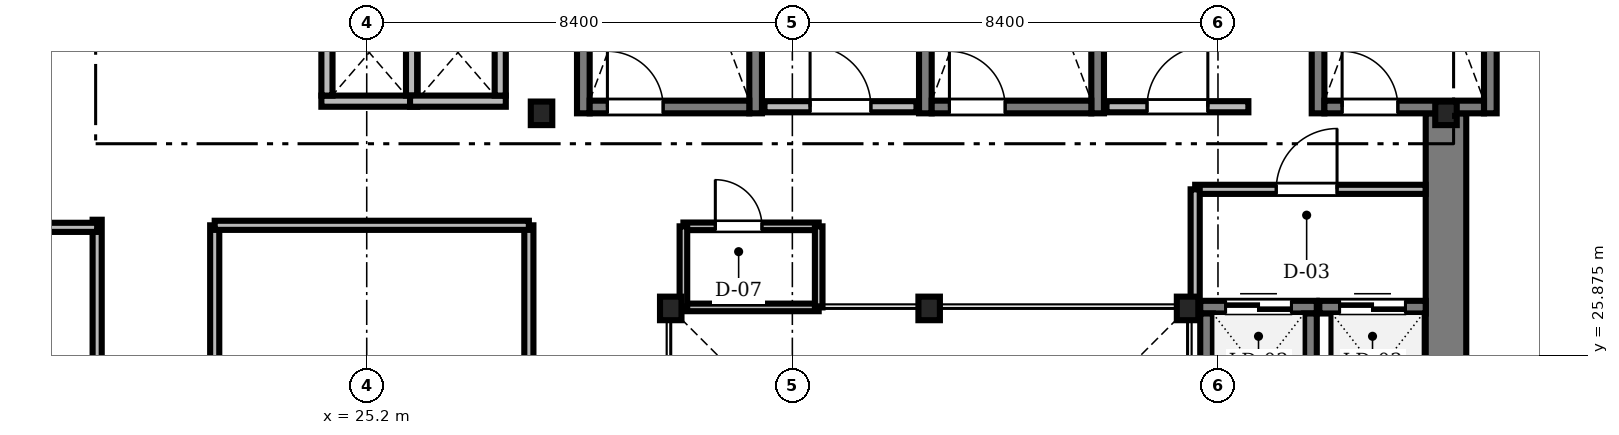
"""IFC4 building model, lengths in metres.
Left out: names, types, materials, properties, quantities, classifications, styles, units other than length and angle.
Written with IfcOpenShell. Run it as: python <this file> out.ifc"""

import sys

from ifc_helpers import new_model, si_unit, direction, frame, frame_2d, origin, origin_2d, place, context, subcontext, project, spatial, rectangle, i_section, extrude, source, transform, mapped, element, fill, save


model = new_model("IFC4")
c1 = context("Model", 3, precision=1e-05, world=origin(), true_north=direction((0.0, 1.0)))
c2 = subcontext(c1, "Body", "Model", "MODEL_VIEW")
j1 = project(units=[si_unit("LENGTHUNIT", "METRE"), si_unit("PLANEANGLEUNIT", "RADIAN")], contexts=[c1])
p1 = place(None, origin())
s1 = spatial("IfcSite", under=j1, at=p1, CompositionType="ELEMENT")
p2 = place(p1, origin())
s2 = spatial("IfcBuilding", under=s1, at=p2, CompositionType="ELEMENT")
p3 = place(p2, frame((0.0, 0.0, 122.4)))
s3 = spatial("IfcBuildingStorey", under=s2, at=p3, CompositionType="ELEMENT", Elevation=122.4)
m1 = source(origin(), c2, "Body", "SweptSolid", [
    extrude(rectangle(XDim=13.15, YDim=0.8, at=frame_2d((6.575, 0.0))), origin(), (0.0, 0.0, 1.0), 3.46),
])
p4 = place(p3, frame((46.5, 17.5, 0.0), z_axis=(0.0, 0.0, 1.0), x_axis=(0.0, 1.0, 0.0)))
e1 = element("IfcWall", 1, at=p4, inside=s3, PredefinedType="SHEAR", context=c2, shape_type="MappedRepresentation", body=[
    mapped(m1, transform((0.0, 0.0, 0.0), scale=1.0)),
])
m2 = source(origin(), c2, "Body", "SweptSolid", [
    extrude(i_section(OverallWidth=0.424, OverallDepth=0.465, WebThickness=0.035, FlangeThickness=0.056, FilletRadius=0.015, at=origin_2d()), origin(), (0.0, 0.0, 1.0), 3.46),
])
for number, where, z_axis, x_axis in (
    (2, (41.4, 26.8, 0.0), (0.0, 0.0, 1.0), (1.0, 0.0, 0.0)),
    (3, (36.3, 26.8, 0.0), (0.0, 0.0, 1.0), (1.0, 0.0, 0.0)),
    (4, (31.2, 26.8, 0.0), (0.0, 0.0, 1.0), (1.0, 0.0, 0.0)),
    (5, (28.65, 30.65, 0.0), (0.0, 0.0, 1.0), (1.0, 0.0, 0.0)),
    (6, (46.5, 30.65, 0.0), (0.0, 0.0, 1.0), (1.0, 0.0, 0.0)),
):
    element("IfcColumn", number, at=place(p3, frame(where, z_axis=z_axis, x_axis=x_axis)), inside=s3, PredefinedType="COLUMN", context=c2, shape_type="MappedRepresentation", body=[
        mapped(m2, transform((0.0, 0.0, 0.0), scale=1.0)),
    ])
m3 = source(origin(), c2, "Body", "SweptSolid", [
    extrude(rectangle(XDim=9.25, YDim=0.25, at=frame_2d((4.625, 0.0))), origin(), (0.0, 0.0, 1.0), 3.5),
])
for number, where, z_axis, x_axis in (
    (7, (29.475, 30.65, 0.0), (0.0, 0.0, 1.0), (0.0, 1.0, 0.0)),
    (8, (32.875, 30.65, 0.0), (0.0, 0.0, 1.0), (0.0, 1.0, 0.0)),
):
    element("IfcWall", number, at=place(p3, frame(where, z_axis=z_axis, x_axis=x_axis)), inside=s3, PredefinedType="SOLIDWALL", context=c2, shape_type="MappedRepresentation", body=[
        mapped(m3, transform((0.0, 0.0, 0.0), scale=1.0)),
    ])
m4 = source(origin(), c2, "Body", "SweptSolid", [
    extrude(rectangle(XDim=3.15, YDim=0.25, at=frame_2d((1.575, 0.0))), origin(), (0.0, 0.0, 1.0), 3.5),
])
p5 = place(p3, frame((29.6, 30.775, 0.0), z_axis=(0.0, 0.0, 1.0), x_axis=(1.0, 0.0, 0.0)))
e9 = element("IfcWall", 9, at=p5, inside=s3, PredefinedType="SOLIDWALL", context=c2, shape_type="MappedRepresentation", body=[
    mapped(m4, transform((0.0, 0.0, 0.0), scale=1.0)),
])
m5 = source(origin(), c2, "Body", "SweptSolid", [
    extrude(rectangle(XDim=1.1, YDim=2.2, at=frame_2d((0.55, 1.1))), frame((0.0, 0.135, 0.0), z_axis=(0.0, -1.0, 0.0), x_axis=(1.0, 0.0, 0.0)), (0.0, 0.0, 1.0), 0.27),
])
p6 = place(p5, frame((0.35, 0.0, 0.0)))
e10 = element("IfcOpeningElement", 10, at=p6, cuts=e9, PredefinedType="OPENING", context=c2, shape_type="MappedRepresentation", body=[
    mapped(m5, transform((0.0, 0.0, 0.0), scale=1.0)),
])
for number, where, z_axis, x_axis in (
    (11, (36.225, 30.65, 0.0), (0.0, 0.0, 1.0), (0.0, 1.0, 0.0)),
    (12, (39.625, 30.65, 0.0), (0.0, 0.0, 1.0), (0.0, 1.0, 0.0)),
):
    element("IfcWall", number, at=place(p3, frame(where, z_axis=z_axis, x_axis=x_axis)), inside=s3, PredefinedType="SOLIDWALL", context=c2, shape_type="MappedRepresentation", body=[
        mapped(m3, transform((0.0, 0.0, 0.0), scale=1.0)),
    ])
p7 = place(p3, frame((36.35, 30.775, 0.0), z_axis=(0.0, 0.0, 1.0), x_axis=(1.0, 0.0, 0.0)))
e13 = element("IfcWall", 13, at=p7, inside=s3, PredefinedType="SOLIDWALL", context=c2, shape_type="MappedRepresentation", body=[
    mapped(m4, transform((0.0, 0.0, 0.0), scale=1.0)),
])
p8 = place(p7, frame((0.35, 0.0, 0.0)))
e14 = element("IfcOpeningElement", 14, at=p8, cuts=e13, PredefinedType="OPENING", context=c2, shape_type="MappedRepresentation", body=[
    mapped(m5, transform((0.0, 0.0, 0.0), scale=1.0)),
])
for number, where, z_axis, x_axis in (
    (15, (43.975, 30.65, 0.0), (0.0, 0.0, 1.0), (0.0, 1.0, 0.0)),
    (16, (47.375, 30.65, 0.0), (0.0, 0.0, 1.0), (0.0, 1.0, 0.0)),
):
    element("IfcWall", number, at=place(p3, frame(where, z_axis=z_axis, x_axis=x_axis)), inside=s3, PredefinedType="SOLIDWALL", context=c2, shape_type="MappedRepresentation", body=[
        mapped(m3, transform((0.0, 0.0, 0.0), scale=1.0)),
    ])
p9 = place(p3, frame((44.1, 30.775, 0.0), z_axis=(0.0, 0.0, 1.0), x_axis=(1.0, 0.0, 0.0)))
e17 = element("IfcWall", 17, at=p9, inside=s3, PredefinedType="SOLIDWALL", context=c2, shape_type="MappedRepresentation", body=[
    mapped(m4, transform((0.0, 0.0, 0.0), scale=1.0)),
])
p10 = place(p9, frame((0.35, 0.0, 0.0)))
e18 = element("IfcOpeningElement", 18, at=p10, cuts=e17, PredefinedType="OPENING", context=c2, shape_type="MappedRepresentation", body=[
    mapped(m5, transform((0.0, 0.0, 0.0), scale=1.0)),
])
m6 = source(origin(), c2, "Body", "SweptSolid", [
    extrude(rectangle(XDim=3.0, YDim=0.22, at=frame_2d((1.5, 0.0))), origin(), (0.0, 0.0, 1.0), 3.46),
])
p11 = place(p3, frame((33.05, 30.78, 0.0), z_axis=(0.0, 0.0, 1.0), x_axis=(1.0, 0.0, 0.0)))
e19 = element("IfcWall", 19, at=p11, inside=s3, PredefinedType="SOLIDWALL", context=c2, shape_type="MappedRepresentation", body=[
    mapped(m6, transform((0.0, 0.0, 0.0), scale=1.0)),
])
m7 = source(origin(), c2, "Body", "SweptSolid", [
    extrude(rectangle(XDim=1.2, YDim=2.2, at=frame_2d((0.6, 1.1))), frame((0.0, 0.12, 0.0), z_axis=(0.0, -1.0, 0.0), x_axis=(1.0, 0.0, 0.0)), (0.0, 0.0, 1.0), 0.24),
])
p12 = place(p11, frame((0.9, 0.0, 0.0)))
e20 = element("IfcOpeningElement", 20, at=p12, cuts=e19, PredefinedType="OPENING", context=c2, shape_type="MappedRepresentation", body=[
    mapped(m7, transform((0.0, 0.0, 0.0), scale=1.0)),
])
m8 = source(origin(), c2, "Body", "SweptSolid", [
    extrude(rectangle(XDim=2.8, YDim=0.22, at=frame_2d((1.4, 0.0))), origin(), (0.0, 0.0, 1.0), 3.46),
])
p13 = place(p3, frame((39.8, 30.78, 0.0), z_axis=(0.0, 0.0, 1.0), x_axis=(1.0, 0.0, 0.0)))
e21 = element("IfcWall", 21, at=p13, inside=s3, PredefinedType="SOLIDWALL", context=c2, shape_type="MappedRepresentation", body=[
    mapped(m8, transform((0.0, 0.0, 0.0), scale=1.0)),
])
p14 = place(p13, frame((0.8, 0.0, 0.0)))
e22 = element("IfcOpeningElement", 22, at=p14, cuts=e21, PredefinedType="OPENING", context=c2, shape_type="MappedRepresentation", body=[
    mapped(m7, transform((0.0, 0.0, 0.0), scale=1.0)),
])
m9 = source(origin(), c2, "Body", "SweptSolid", [
    extrude(rectangle(XDim=1.89, YDim=0.22, at=frame_2d((0.945, 0.0))), origin(), (0.0, 0.0, 1.0), 3.46),
])
p15 = place(p3, frame((24.305, 30.89, 0.0), z_axis=(0.0, 0.0, 1.0), x_axis=(1.0, 0.0, 0.0)))
e23 = element("IfcWall", 23, at=p15, inside=s3, PredefinedType="SOLIDWALL", context=c2, shape_type="MappedRepresentation", body=[
    mapped(m9, transform((0.0, 0.0, 0.0), scale=1.0)),
])
m10 = source(origin(), c2, "Body", "SweptSolid", [
    extrude(rectangle(XDim=1.7, YDim=0.22, at=frame_2d((0.85, 0.0))), origin(), (0.0, 0.0, 1.0), 3.46),
])
for number, where, z_axis, x_axis in (
    (24, (24.415, 31.0, 0.0), (0.0, 0.0, 1.0), (0.0, 1.0, 0.0)),
    (25, (26.085, 31.0, 0.0), (0.0, 0.0, 1.0), (0.0, 1.0, 0.0)),
):
    element("IfcWall", number, at=place(p3, frame(where, z_axis=z_axis, x_axis=x_axis)), inside=s3, PredefinedType="SOLIDWALL", context=c2, shape_type="MappedRepresentation", body=[
        mapped(m10, transform((0.0, 0.0, 0.0), scale=1.0)),
    ])
p16 = place(p3, frame((26.055, 30.89, 0.0), z_axis=(0.0, 0.0, 1.0), x_axis=(1.0, 0.0, 0.0)))
e26 = element("IfcWall", 26, at=p16, inside=s3, PredefinedType="SOLIDWALL", context=c2, shape_type="MappedRepresentation", body=[
    mapped(m9, transform((0.0, 0.0, 0.0), scale=1.0)),
])
p17 = place(p3, frame((27.835, 31.0, 0.0), z_axis=(0.0, 0.0, 1.0), x_axis=(0.0, 1.0, 0.0)))
e27 = element("IfcWall", 27, at=p17, inside=s3, PredefinedType="SOLIDWALL", context=c2, shape_type="MappedRepresentation", body=[
    mapped(m10, transform((0.0, 0.0, 0.0), scale=1.0)),
])
m11 = source(origin(), c2, "Body", "SweptSolid", [
    extrude(rectangle(XDim=2.3, YDim=0.25, at=frame_2d((1.15, 0.0))), origin(), (0.0, 0.0, 1.0), 3.46),
])
p18 = place(p3, frame((41.65, 26.825, 0.0), z_axis=(0.0, 0.0, 1.0), x_axis=(1.0, 0.0, 0.0)))
e28 = element("IfcWall", 28, at=p18, inside=s3, PredefinedType="SOLIDWALL", context=c2, shape_type="MappedRepresentation", body=[
    mapped(m11, transform((0.0, 0.0, 0.0), scale=1.0)),
])
m12 = source(origin(), c2, "Body", "SweptSolid", [
    extrude(rectangle(XDim=1.3, YDim=2.3, at=frame_2d((0.65, 1.15))), frame((0.0, 0.135, 0.0), z_axis=(0.0, -1.0, 0.0), x_axis=(1.0, 0.0, 0.0)), (0.0, 0.0, 1.0), 0.27),
])
p19 = place(p18, frame((0.5, 0.0, 0.0)))
e29 = element("IfcOpeningElement", 29, at=p19, cuts=e28, PredefinedType="OPENING", context=c2, shape_type="MappedRepresentation", body=[
    mapped(m12, transform((0.0, 0.0, 0.0), scale=1.0)),
])
for number, where, z_axis, x_axis in (
    (30, (41.775, 24.4, 0.0), (0.0, 0.0, 1.0), (0.0, 1.0, 0.0)),
    (31, (43.825, 24.4, 0.0), (0.0, 0.0, 1.0), (0.0, 1.0, 0.0)),
):
    element("IfcWall", number, at=place(p3, frame(where, z_axis=z_axis, x_axis=x_axis)), inside=s3, PredefinedType="SOLIDWALL", context=c2, shape_type="MappedRepresentation", body=[
        mapped(m11, transform((0.0, 0.0, 0.0), scale=1.0)),
    ])
m13 = source(origin(), c2, "Body", "SweptSolid", [
    extrude(rectangle(XDim=2.1, YDim=0.25, at=frame_2d((1.05, 0.0))), origin(), (0.0, 0.0, 1.0), 3.46),
])
p20 = place(p3, frame((44.0, 26.825, 0.0), z_axis=(0.0, 0.0, 1.0), x_axis=(1.0, 0.0, 0.0)))
e32 = element("IfcWall", 32, at=p20, inside=s3, PredefinedType="SOLIDWALL", context=c2, shape_type="MappedRepresentation", body=[
    mapped(m13, transform((0.0, 0.0, 0.0), scale=1.0)),
])
p21 = place(p20, frame((0.4, 0.0, 0.0)))
e33 = element("IfcOpeningElement", 33, at=p21, cuts=e32, PredefinedType="OPENING", context=c2, shape_type="MappedRepresentation", body=[
    mapped(m12, transform((0.0, 0.0, 0.0), scale=1.0)),
])
m14 = source(origin(), c2, "Body", "SweptSolid", [
    extrude(rectangle(XDim=6.54, YDim=0.18, at=frame_2d((3.27, 0.0))), origin(), (0.0, 0.0, 1.0), 2.852),
])
p22 = place(p3, frame((22.2, 21.9, 0.0), z_axis=(0.0, 0.0, 1.0), x_axis=(0.0, 1.0, 0.0)))
e34 = element("IfcWall", 34, at=p22, inside=s3, PredefinedType="PARTITIONING", context=c2, shape_type="MappedRepresentation", body=[
    mapped(m14, transform((0.0, 0.0, 0.0), scale=1.0)),
])
m15 = source(origin(), c2, "Body", "SweptSolid", [
    extrude(rectangle(XDim=1.05, YDim=2.2, at=frame_2d((0.525, 1.1))), frame((0.0, 0.1, 0.0), z_axis=(0.0, -1.0, 0.0), x_axis=(1.0, 0.0, 0.0)), (0.0, 0.0, 1.0), 0.2),
])
p23 = place(p22, frame((2.2, 0.0, 0.0)))
e35 = element("IfcOpeningElement", 35, at=p23, cuts=e34, PredefinedType="OPENING", context=c2, shape_type="MappedRepresentation", body=[
    mapped(m15, transform((0.0, 0.0, 0.0), scale=1.0)),
])
m16 = source(origin(), c2, "Body", "SweptSolid", [
    extrude(rectangle(XDim=4.548, YDim=0.18, at=frame_2d((2.274, 0.0))), origin(), (0.0, 0.0, 1.0), 3.092),
])
p24 = place(p3, frame((41.55, 29.15, 0.0), z_axis=(0.0, 0.0, 1.0), x_axis=(1.0, 0.0, 0.0)))
e36 = element("IfcWall", 36, at=p24, inside=s3, PredefinedType="PARTITIONING", context=c2, shape_type="MappedRepresentation", body=[
    mapped(m16, transform((0.0, 0.0, 0.0), scale=1.0)),
])
m17 = source(origin(), c2, "Body", "SweptSolid", [
    extrude(rectangle(XDim=1.2, YDim=2.2, at=frame_2d((0.6, 1.1))), frame((0.0, 0.1, 0.0), z_axis=(0.0, -1.0, 0.0), x_axis=(1.0, 0.0, 0.0)), (0.0, 0.0, 1.0), 0.2),
])
p25 = place(p24, frame((1.6, 0.0, 0.0)))
e37 = element("IfcOpeningElement", 37, at=p25, cuts=e36, PredefinedType="OPENING", context=c2, shape_type="MappedRepresentation", body=[
    mapped(m17, transform((0.0, 0.0, 0.0), scale=1.0)),
])
m18 = source(origin(), c2, "Body", "SweptSolid", [
    extrude(rectangle(XDim=2.67, YDim=0.15, at=frame_2d((1.335, 0.0))), origin(), (0.0, 0.0, 1.0), 3.092),
])
p26 = place(p3, frame((31.45, 28.42, 0.0), z_axis=(0.0, 0.0, 1.0), x_axis=(1.0, 0.0, 0.0)))
e38 = element("IfcWall", 38, at=p26, inside=s3, PredefinedType="PARTITIONING", context=c2, shape_type="MappedRepresentation", body=[
    mapped(m18, transform((0.0, 0.0, 0.0), scale=1.0)),
])
m19 = source(origin(), c2, "Body", "SweptSolid", [
    extrude(rectangle(XDim=0.92, YDim=2.1, at=frame_2d((0.46, 1.05))), frame((0.0, 0.085, 0.0), z_axis=(0.0, -1.0, 0.0), x_axis=(1.0, 0.0, 0.0)), (0.0, 0.0, 1.0), 0.17),
])
p27 = place(p26, frame((0.63, 0.0, 0.0)))
e39 = element("IfcOpeningElement", 39, at=p27, cuts=e38, PredefinedType="OPENING", context=c2, shape_type="MappedRepresentation", body=[
    mapped(m19, transform((0.0, 0.0, 0.0), scale=1.0)),
])
m20 = source(origin(), c2, "Body", "SweptSolid", [
    extrude(rectangle(XDim=14.45, YDim=0.18, at=frame_2d((7.225, 0.0))), origin(), (0.0, 0.0, 1.0), 2.852),
])
p28 = place(p3, frame((19.88, 14.1, 0.0), z_axis=(0.0, 0.0, 1.0), x_axis=(0.0, 1.0, 0.0)))
e40 = element("IfcWall", 40, at=p28, inside=s3, PredefinedType="PARTITIONING", context=c2, shape_type="MappedRepresentation", body=[
    mapped(m20, transform((0.0, 0.0, 0.0), scale=1.0)),
])
m21 = source(origin(), c2, "Body", "SweptSolid", [
    extrude(rectangle(XDim=13.15, YDim=0.18, at=frame_2d((6.575, 0.0))), origin(), (0.0, 0.0, 1.0), 2.702),
])
p29 = place(p3, frame((6.73, 28.4, 0.0), z_axis=(0.0, 0.0, 1.0), x_axis=(1.0, 0.0, 0.0)))
e41 = element("IfcWall", 41, at=p29, inside=s3, PredefinedType="PARTITIONING", context=c2, shape_type="MappedRepresentation", body=[
    mapped(m21, transform((0.0, 0.0, 0.0), scale=1.0)),
])
p30 = place(p3, frame((28.4, 21.9, 0.0), z_axis=(0.0, 0.0, 1.0), x_axis=(0.0, 1.0, 0.0)))
e42 = element("IfcWall", 42, at=p30, inside=s3, PredefinedType="PARTITIONING", context=c2, shape_type="MappedRepresentation", body=[
    mapped(m14, transform((0.0, 0.0, 0.0), scale=1.0)),
])
m22 = source(origin(), c2, "Body", "SweptSolid", [
    extrude(rectangle(XDim=6.2, YDim=0.18, at=frame_2d((3.1, 0.0))), origin(), (0.0, 0.0, 1.0), 3.46),
])
p31 = place(p3, frame((22.2, 28.44, 0.0), z_axis=(0.0, 0.0, 1.0), x_axis=(1.0, 0.0, 0.0)))
e43 = element("IfcWall", 43, at=p31, inside=s3, PredefinedType="PARTITIONING", context=c2, shape_type="MappedRepresentation", body=[
    mapped(m22, transform((0.0, 0.0, 0.0), scale=1.0)),
])
m23 = source(origin(), c2, "Body", "SweptSolid", [
    extrude(rectangle(XDim=2.67, YDim=0.15, at=frame_2d((1.335, 0.0))), origin(), (0.0, 0.0, 1.0), 3.002),
])
p32 = place(p3, frame((31.45, 26.82, 0.0), z_axis=(0.0, 0.0, 1.0), x_axis=(1.0, 0.0, 0.0)))
e44 = element("IfcWall", 44, at=p32, inside=s3, PredefinedType="PARTITIONING", context=c2, shape_type="MappedRepresentation", body=[
    mapped(m23, transform((0.0, 0.0, 0.0), scale=1.0)),
])
m24 = source(origin(), c2, "Body", "SweptSolid", [
    extrude(rectangle(XDim=2.35, YDim=0.18, at=frame_2d((1.175, 0.0))), origin(), (0.0, 0.0, 1.0), 2.852),
])
p33 = place(p3, frame((41.55, 26.8, 0.0), z_axis=(0.0, 0.0, 1.0), x_axis=(0.0, 1.0, 0.0)))
e45 = element("IfcWall", 45, at=p33, inside=s3, PredefinedType="PARTITIONING", context=c2, shape_type="MappedRepresentation", body=[
    mapped(m24, transform((0.0, 0.0, 0.0), scale=1.0)),
])
m25 = source(origin(), c2, "Body", "SweptSolid", [
    extrude(rectangle(XDim=1.6, YDim=0.15, at=frame_2d((0.8, 0.0))), origin(), (0.0, 0.0, 1.0), 3.002),
])
for number, where, z_axis, x_axis in (
    (46, (31.45, 26.82, 0.0), (0.0, 0.0, 1.0), (0.0, 1.0, 0.0)),
    (47, (34.12, 26.82, 0.0), (0.0, 0.0, 1.0), (0.0, 1.0, 0.0)),
):
    element("IfcWall", number, at=place(p3, frame(where, z_axis=z_axis, x_axis=x_axis)), inside=s3, PredefinedType="PARTITIONING", context=c2, shape_type="MappedRepresentation", body=[
        mapped(m25, transform((0.0, 0.0, 0.0), scale=1.0)),
    ])
m26 = source(origin(), c2, "Body", "SweptSolid", [
    extrude(rectangle(XDim=1.1, YDim=2.2, at=frame_2d((0.55, 1.1))), frame((0.0, 0.025, 0.0), z_axis=(0.0, -1.0, 0.0), x_axis=(1.0, 0.0, 0.0)), (0.0, 0.0, 1.0), 0.05),
])
p34 = place(p6, origin())
e48 = element("IfcDoor", 48, at=p34, inside=s3, OperationType="SINGLE_SWING_LEFT", PredefinedType="DOOR", context=c2, shape_type="MappedRepresentation", body=[
    mapped(m26, transform((0.0, 0.0, 0.0), scale=1.0)),
])
fill(e10, e48)
p35 = place(p8, origin())
e49 = element("IfcDoor", 49, at=p35, inside=s3, OperationType="SINGLE_SWING_LEFT", PredefinedType="DOOR", context=c2, shape_type="MappedRepresentation", body=[
    mapped(m26, transform((0.0, 0.0, 0.0), scale=1.0)),
])
fill(e14, e49)
p36 = place(p10, origin())
e50 = element("IfcDoor", 50, at=p36, inside=s3, OperationType="SINGLE_SWING_LEFT", PredefinedType="DOOR", context=c2, shape_type="MappedRepresentation", body=[
    mapped(m26, transform((0.0, 0.0, 0.0), scale=1.0)),
])
fill(e18, e50)
m27 = source(origin(), c2, "Body", "SweptSolid", [
    extrude(rectangle(XDim=1.2, YDim=2.2, at=frame_2d((0.6, 1.1))), frame((0.0, 0.025, 0.0), z_axis=(0.0, -1.0, 0.0), x_axis=(1.0, 0.0, 0.0)), (0.0, 0.0, 1.0), 0.05),
])
p37 = place(p12, origin())
e51 = element("IfcDoor", 51, at=p37, inside=s3, OperationType="SINGLE_SWING_LEFT", PredefinedType="DOOR", context=c2, shape_type="MappedRepresentation", body=[
    mapped(m27, transform((0.0, 0.0, 0.0), scale=1.0)),
])
fill(e20, e51)
p38 = place(p14, origin())
e52 = element("IfcDoor", 52, at=p38, inside=s3, OperationType="SINGLE_SWING_RIGHT", PredefinedType="DOOR", context=c2, shape_type="MappedRepresentation", body=[
    mapped(m27, transform((0.0, 0.0, 0.0), scale=1.0)),
])
fill(e22, e52)
m28 = source(origin(), c2, "Body", "SweptSolid", [
    extrude(rectangle(XDim=1.3, YDim=2.3, at=frame_2d((0.65, 1.15))), frame((0.0, 0.025, 0.0), z_axis=(0.0, -1.0, 0.0), x_axis=(1.0, 0.0, 0.0)), (0.0, 0.0, 1.0), 0.05),
])
p39 = place(p19, origin())
e53 = element("IfcDoor", 53, at=p39, inside=s3, OperationType="DOUBLE_DOOR_SLIDING", PredefinedType="DOOR", context=c2, shape_type="MappedRepresentation", body=[
    mapped(m28, transform((0.0, 0.0, 0.0), scale=1.0)),
])
fill(e29, e53)
p40 = place(p21, origin())
e54 = element("IfcDoor", 54, at=p40, inside=s3, OperationType="DOUBLE_DOOR_SLIDING", PredefinedType="DOOR", context=c2, shape_type="MappedRepresentation", body=[
    mapped(m28, transform((0.0, 0.0, 0.0), scale=1.0)),
])
fill(e33, e54)
p41 = place(p25, origin())
e55 = element("IfcDoor", 55, at=p41, inside=s3, OperationType="SINGLE_SWING_RIGHT", PredefinedType="DOOR", context=c2, shape_type="MappedRepresentation", body=[
    mapped(m27, transform((0.0, 0.0, 0.0), scale=1.0)),
])
fill(e37, e55)
m29 = source(origin(), c2, "Body", "SweptSolid", [
    extrude(rectangle(XDim=0.92, YDim=2.1, at=frame_2d((0.46, 1.05))), frame((0.0, 0.025, 0.0), z_axis=(0.0, -1.0, 0.0), x_axis=(1.0, 0.0, 0.0)), (0.0, 0.0, 1.0), 0.05),
])
p42 = place(p27, origin())
e56 = element("IfcDoor", 56, at=p42, inside=s3, OperationType="SINGLE_SWING_LEFT", PredefinedType="DOOR", context=c2, shape_type="MappedRepresentation", body=[
    mapped(m29, transform((0.0, 0.0, 0.0), scale=1.0)),
])
fill(e39, e56)
save(model, sys.argv[1])
